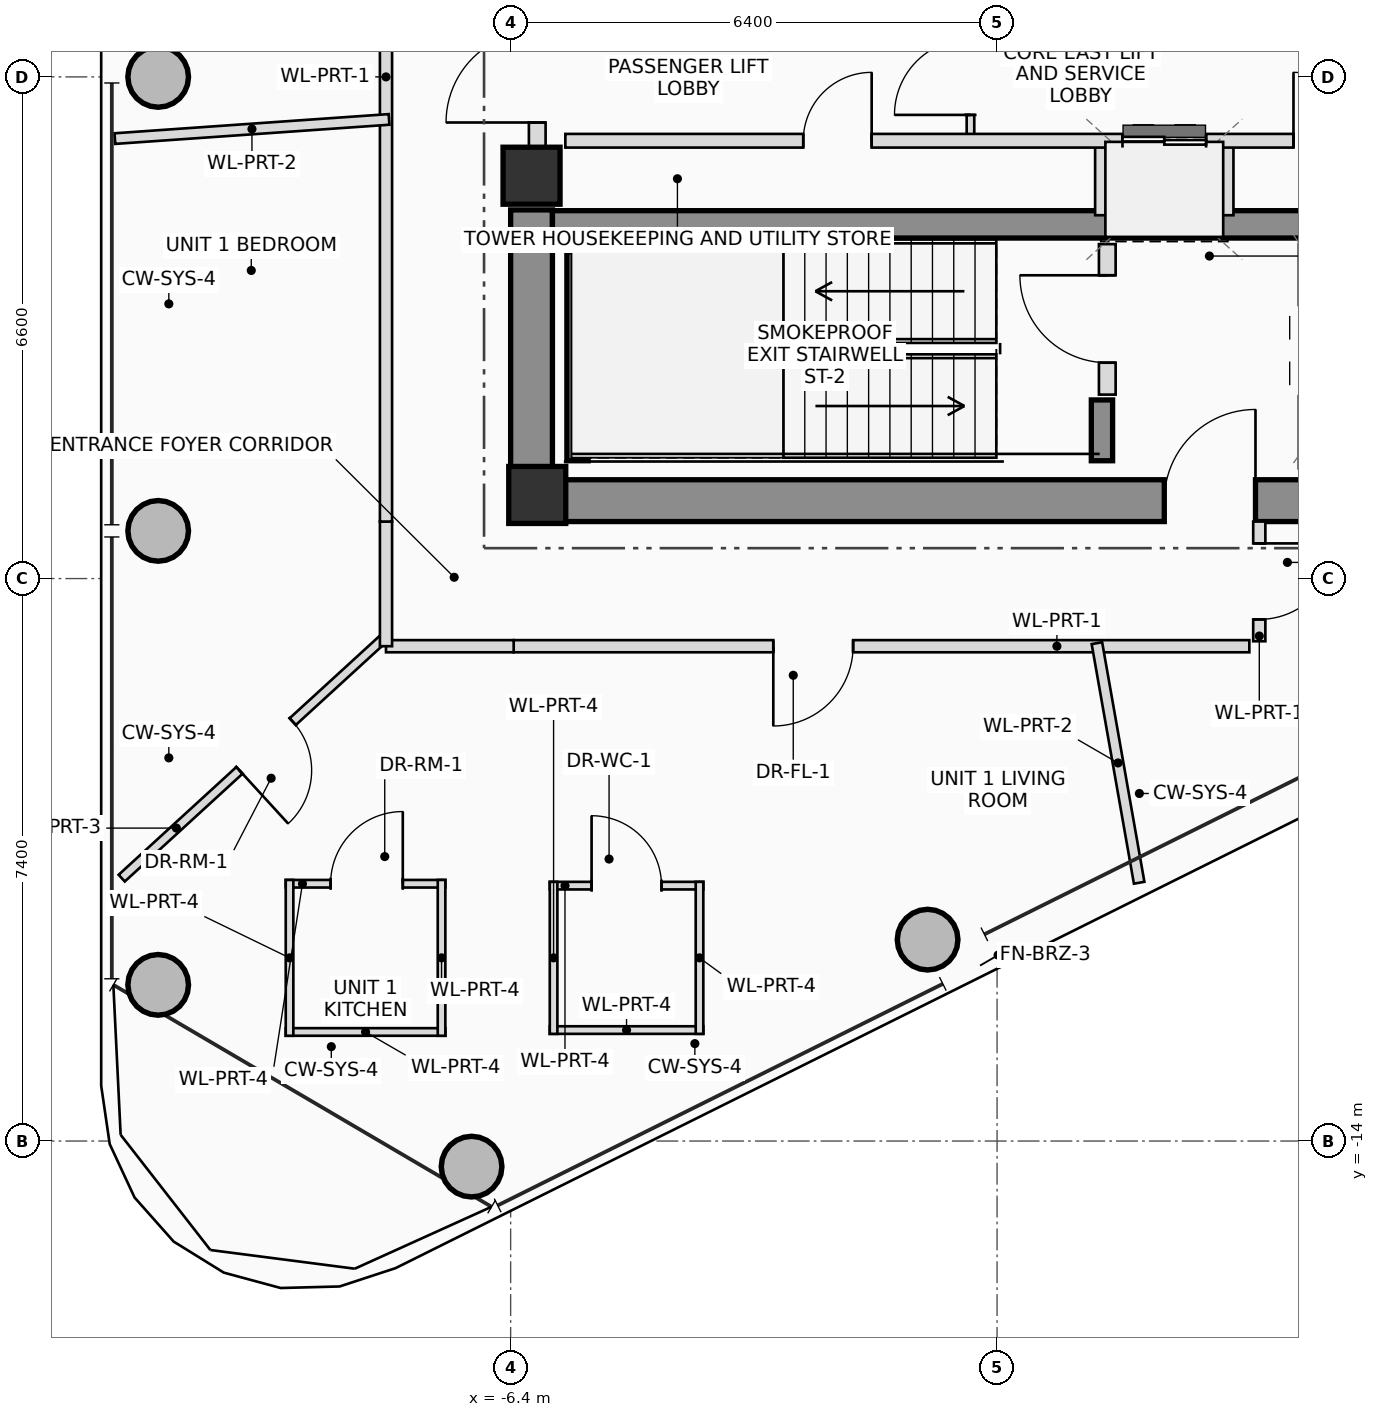
"""IFC4 building model, lengths in metres.
Left out: names, types, materials, properties, quantities, classifications, styles, units other than length and angle.
Written with IfcOpenShell. Run it as: python <this file> out.ifc"""

import sys

from ifc_helpers import new_model, si_unit, direction, frame, frame_2d, origin, origin_2d, place, context, subcontext, project, spatial, rectangle, hollow_circle, extrude, source, transform, mapped, element, fill, save


model = new_model("IFC4")
c1 = context("Model", 3, precision=1e-05, world=origin(), true_north=direction((0.0, 1.0)))
c2 = subcontext(c1, "Body", "Model", "MODEL_VIEW")
j1 = project(units=[si_unit("LENGTHUNIT", "METRE"), si_unit("PLANEANGLEUNIT", "RADIAN")], contexts=[c1])
p1 = place(None, origin())
s1 = spatial("IfcSite", under=j1, at=p1, CompositionType="ELEMENT")
p2 = place(p1, origin())
s2 = spatial("IfcBuilding", under=s1, at=p2, CompositionType="ELEMENT")
p3 = place(p2, frame((0.0, 0.0, 307.1)))
s3 = spatial("IfcBuildingStorey", under=s2, at=p3, CompositionType="ELEMENT", Elevation=307.1)
m1 = source(origin(), c2, "Body", "SweptSolid", [
    extrude(rectangle(XDim=0.75, YDim=0.75, at=origin_2d()), origin(), (0.0, 0.0, 1.0), 3.45),
])
p4 = place(p3, frame((-6.05, -5.5, 0.0), z_axis=(0.0, 0.0, 1.0), x_axis=(1.0, 0.0, 0.0)))
e1 = element("IfcColumn", 1, at=p4, inside=s3, PredefinedType="COLUMN", context=c2, shape_type="MappedRepresentation", body=[
    mapped(m1, transform((0.0, 0.0, 0.0), scale=1.0)),
])
p5 = place(p3, frame((-6.4, -5.575, 0.0), z_axis=(0.0, 0.0, 1.0), x_axis=(1.0, 0.0, 0.0)))
e2 = element("IfcWall", 2, at=p5, inside=s3, PredefinedType="SHEAR", context=c2, shape_type="SweptSolid", body=[
    extrude(rectangle(XDim=12.8, YDim=0.55, at=frame_2d((6.4, 0.0))), origin(), (0.0, 0.0, 1.0), 3.45),
])
p6 = place(p5, frame((8.6, 0.0, 0.0)))
e3 = element("IfcOpeningElement", 3, at=p6, cuts=e2, PredefinedType="OPENING", context=c2, shape_type="SweptSolid", body=[
    extrude(rectangle(XDim=1.2, YDim=2.2, at=frame_2d((0.6, 1.1))), frame((0.0, 0.285, 0.0), z_axis=(0.0, -1.0, 0.0), x_axis=(1.0, 0.0, 0.0)), (0.0, 0.0, 1.0), 0.57),
])
p7 = place(p3, frame((-6.125, -5.3, 0.0), z_axis=(0.0, 0.0, 1.0), x_axis=(0.0, 1.0, 0.0)))
e4 = element("IfcWall", 4, at=p7, inside=s3, PredefinedType="SHEAR", context=c2, shape_type="SweptSolid", body=[
    extrude(rectangle(XDim=3.55, YDim=0.55, at=frame_2d((1.775, 0.0))), origin(), (0.0, 0.0, 1.0), 3.45),
])
p8 = place(p3, frame((-5.85, -1.94, 0.0), z_axis=(0.0, 0.0, 1.0), x_axis=(1.0, 0.0, 0.0)))
e5 = element("IfcWall", 5, at=p8, inside=s3, PredefinedType="SHEAR", context=c2, shape_type="SweptSolid", body=[
    extrude(rectangle(XDim=11.7, YDim=0.36, at=frame_2d((5.85, 0.0))), origin(), (0.0, 0.0, 1.0), 3.45),
])
p9 = place(p3, frame((-5.52, -5.05, 0.0), z_axis=(0.0, 0.0, 1.0), x_axis=(0.0, 1.0, 0.0)))
e6 = element("IfcWall", 6, at=p9, inside=s3, PredefinedType="SHEAR", context=c2, shape_type="SweptSolid", body=[
    extrude(rectangle(XDim=2.75, YDim=0.28, at=frame_2d((1.375, 0.0))), origin(), (0.0, 0.0, 1.0), 3.45),
])
p10 = place(p3, frame((1.38, -5.05, 0.0), z_axis=(0.0, 0.0, 1.0), x_axis=(0.0, 1.0, 0.0)))
e7 = element("IfcWall", 7, at=p10, inside=s3, PredefinedType="SHEAR", context=c2, shape_type="SweptSolid", body=[
    extrude(rectangle(XDim=0.8, YDim=0.28, at=frame_2d((0.4, 0.0))), origin(), (0.0, 0.0, 1.0), 3.45),
])
p11 = place(p3, frame((-6.125, -1.3, 0.0), z_axis=(0.0, 0.0, 1.0), x_axis=(1.0, 0.0, 0.0)))
e8 = element("IfcColumn", 8, at=p11, inside=s3, PredefinedType="COLUMN", context=c2, shape_type="MappedRepresentation", body=[
    mapped(m1, transform((0.0, 0.0, 0.0), scale=1.0)),
])
m2 = source(origin(), c2, "Body", "SweptSolid", [
    extrude(hollow_circle(Radius=0.4, WallThickness=0.028, at=origin_2d()), origin(), (0.0, 0.0, 1.0), 3.45),
])
for number, where, z_axis, x_axis in (
    (9, (-6.914, -14.337, 0.0), (0.0, 0.0, 1.0), (1.0, 0.0, 0.0)),
    (10, (-0.914, -11.35, 0.0), (0.0, 0.0, 1.0), (1.0, 0.0, 0.0)),
    (11, (-11.037, 0.0, 0.0), (0.0, 0.0, 1.0), (1.0, 0.0, 0.0)),
    (12, (-11.037, -5.973, 0.0), (0.0, 0.0, 1.0), (1.0, 0.0, 0.0)),
    (13, (-11.037, -11.945, 0.0), (0.0, 0.0, 1.0), (1.0, 0.0, 0.0)),
):
    element("IfcColumn", number, at=place(p3, frame(where, z_axis=z_axis, x_axis=x_axis)), inside=s3, PredefinedType="COLUMN", context=c2, shape_type="MappedRepresentation", body=[
        mapped(m2, transform((0.0, 0.0, 0.0), scale=1.0)),
    ])
p12 = place(p3, frame((-6.05, -0.95, 0.0), z_axis=(0.0, 0.0, 1.0), x_axis=(0.0, 1.0, 0.0)))
e14 = element("IfcWall", 14, at=p12, inside=s3, PredefinedType="PLUMBINGWALL", context=c2, shape_type="SweptSolid", body=[
    extrude(rectangle(XDim=1.9, YDim=0.22, at=frame_2d((0.95, 0.0))), origin(), (0.0, 0.0, 1.0), 2.23),
])
p13 = place(p12, frame((0.35, 0.0, 0.0)))
e15 = element("IfcOpeningElement", 15, at=p13, cuts=e14, PredefinedType="OPENING", context=c2, shape_type="SweptSolid", body=[
    extrude(rectangle(XDim=1.2, YDim=2.2, at=frame_2d((0.6, 1.1))), frame((0.0, 0.12, 0.0), z_axis=(0.0, -1.0, 0.0), x_axis=(1.0, 0.0, 0.0)), (0.0, 0.0, 1.0), 0.24),
])
p14 = place(p3, frame((1.45, -4.18, 0.0), z_axis=(0.0, 0.0, 1.0), x_axis=(0.0, 1.0, 0.0)))
e16 = element("IfcWall", 16, at=p14, inside=s3, PredefinedType="PLUMBINGWALL", context=c2, shape_type="SweptSolid", body=[
    extrude(rectangle(XDim=1.98, YDim=0.22, at=frame_2d((0.99, 0.0))), origin(), (0.0, 0.0, 1.0), 3.25),
])
p15 = place(p14, frame((0.42, 0.0, 0.0)))
e17 = element("IfcOpeningElement", 17, at=p15, cuts=e16, PredefinedType="OPENING", context=c2, shape_type="SweptSolid", body=[
    extrude(rectangle(XDim=1.15, YDim=2.15, at=frame_2d((0.575, 1.075))), frame((0.0, 0.12, 0.0), z_axis=(0.0, -1.0, 0.0), x_axis=(1.0, 0.0, 0.0)), (0.0, 0.0, 1.0), 0.24),
])
p16 = place(p3, frame((-0.35, -0.84, 0.0), z_axis=(0.0, 0.0, 1.0), x_axis=(0.0, 1.0, 0.0)))
e18 = element("IfcWall", 18, at=p16, inside=s3, PredefinedType="PARTITIONING", context=c2, shape_type="SweptSolid", body=[
    extrude(rectangle(XDim=1.68, YDim=0.1, at=frame_2d((0.84, 0.0))), origin(), (0.0, 0.0, 1.0), 3.25),
])
p17 = place(p16, frame((0.34, 0.0, 0.0)))
e19 = element("IfcOpeningElement", 19, at=p17, cuts=e18, PredefinedType="OPENING", context=c2, shape_type="SweptSolid", body=[
    extrude(rectangle(XDim=1.0, YDim=2.25, at=frame_2d((0.5, 1.125))), frame((0.0, 0.06, 0.0), z_axis=(0.0, -1.0, 0.0), x_axis=(1.0, 0.0, 0.0)), (0.0, 0.0, 1.0), 0.12),
])
for number, where, z_axis, x_axis in (
    (20, (1.38, -1.82, 0.0), (0.0, 0.0, 1.0), (0.0, 1.0, 0.0)),
    (21, (3.02, -1.82, 0.0), (0.0, 0.0, 1.0), (0.0, 1.0, 0.0)),
):
    element("IfcWall", number, at=place(p3, frame(where, z_axis=z_axis, x_axis=x_axis)), inside=s3, PredefinedType="PLUMBINGWALL", context=c2, shape_type="SweptSolid", body=[
        extrude(rectangle(XDim=0.98, YDim=0.18, at=frame_2d((0.49, 0.0))), origin(), (0.0, 0.0, 1.0), 3.25),
    ])
p18 = place(p3, frame((-5.68, -0.84, 0.0), z_axis=(0.0, 0.0, 1.0), x_axis=(1.0, 0.0, 0.0)))
e22 = element("IfcWall", 22, at=p18, inside=s3, PredefinedType="PLUMBINGWALL", context=c2, shape_type="SweptSolid", body=[
    extrude(rectangle(XDim=11.33, YDim=0.18, at=frame_2d((5.665, 0.0))), origin(), (0.0, 0.0, 1.0), 3.25),
])
p19 = place(p18, frame((3.13, 0.0, 0.0)))
e23 = element("IfcOpeningElement", 23, at=p19, cuts=e22, PredefinedType="OPENING", context=c2, shape_type="SweptSolid", body=[
    extrude(rectangle(XDim=0.9, YDim=2.05, at=frame_2d((0.45, 1.025))), frame((0.0, 0.1, 0.0), z_axis=(0.0, -1.0, 0.0), x_axis=(1.0, 0.0, 0.0)), (0.0, 0.0, 1.0), 0.2),
])
p20 = place(p18, frame((7.33, 0.0, 0.0)))
e24 = element("IfcOpeningElement", 24, at=p20, cuts=e22, PredefinedType="OPENING", context=c2, shape_type="SweptSolid", body=[
    extrude(rectangle(XDim=1.1, YDim=2.2, at=frame_2d((0.55, 1.1))), frame((0.0, 0.1, 0.0), z_axis=(0.0, -1.0, 0.0), x_axis=(1.0, 0.0, 0.0)), (0.0, 0.0, 1.0), 0.2),
])
p21 = place(p18, frame((9.58, 0.0, 0.0)))
e25 = element("IfcOpeningElement", 25, at=p21, cuts=e22, PredefinedType="OPENING", context=c2, shape_type="SweptSolid", body=[
    extrude(rectangle(XDim=0.9, YDim=2.05, at=frame_2d((0.45, 1.025))), frame((0.0, 0.1, 0.0), z_axis=(0.0, -1.0, 0.0), x_axis=(1.0, 0.0, 0.0)), (0.0, 0.0, 1.0), 0.2),
])
p22 = place(p3, frame((-8.07, -7.386, 0.0), z_axis=(0.0, 0.0, 1.0), x_axis=(-0.737657036201, -0.675175604523, 0.0)))
e26 = element("IfcWall", 26, at=p22, inside=s3, PredefinedType="PARTITIONING", context=c2, shape_type="SweptSolid", body=[
    extrude(rectangle(XDim=4.673, YDim=0.12, at=frame_2d((2.337, 0.0))), origin(), (0.0, 0.0, 1.0), 2.815),
])
p23 = place(p22, frame((1.623, 0.0, 0.0)))
e27 = element("IfcOpeningElement", 27, at=p23, cuts=e26, PredefinedType="OPENING", context=c2, shape_type="SweptSolid", body=[
    extrude(rectangle(XDim=0.95, YDim=2.1, at=frame_2d((0.475, 1.05))), frame((0.0, 0.07, 0.0), z_axis=(0.0, -1.0, 0.0), x_axis=(1.0, 0.0, 0.0)), (0.0, 0.0, 1.0), 0.14),
])
p24 = place(p3, frame((-5.885, -10.64, 0.0), z_axis=(0.0, 0.0, 1.0), x_axis=(1.0, 0.0, 0.0)))
e28 = element("IfcWall", 28, at=p24, inside=s3, PredefinedType="PARTITIONING", context=c2, shape_type="SweptSolid", body=[
    extrude(rectangle(XDim=2.02, YDim=0.1, at=frame_2d((1.01, 0.0))), origin(), (0.0, 0.0, 1.0), 2.905),
])
p25 = place(p24, frame((0.55, 0.0, 0.0)))
e29 = element("IfcOpeningElement", 29, at=p25, cuts=e28, PredefinedType="OPENING", context=c2, shape_type="SweptSolid", body=[
    extrude(rectangle(XDim=0.92, YDim=2.1, at=frame_2d((0.46, 1.05))), frame((0.0, 0.06, 0.0), z_axis=(0.0, -1.0, 0.0), x_axis=(1.0, 0.0, 0.0)), (0.0, 0.0, 1.0), 0.12),
])
p26 = place(p3, frame((-3.865, -12.54, 0.0), z_axis=(0.0, 0.0, 1.0), x_axis=(-1.0, 0.0, 0.0)))
e30 = element("IfcWall", 30, at=p26, inside=s3, PredefinedType="PARTITIONING", context=c2, shape_type="SweptSolid", body=[
    extrude(rectangle(XDim=2.02, YDim=0.1, at=frame_2d((1.01, 0.0))), origin(), (0.0, 0.0, 1.0), 3.25),
])
for number, where, z_axis, x_axis in (
    (31, (-3.915, -10.59, 0.0), (0.0, 0.0, 1.0), (0.0, -1.0, 0.0)),
    (32, (-5.835, -12.59, 0.0), (0.0, 0.0, 1.0), (0.0, 1.0, 0.0)),
):
    element("IfcWall", number, at=place(p3, frame(where, z_axis=z_axis, x_axis=x_axis)), inside=s3, PredefinedType="PARTITIONING", context=c2, shape_type="SweptSolid", body=[
        extrude(rectangle(XDim=2.0, YDim=0.1, at=frame_2d((1.0, 0.0))), origin(), (0.0, 0.0, 1.0), 2.905),
    ])
p27 = place(p3, frame((-9.359, -10.615, 0.0), z_axis=(0.0, 0.0, 1.0), x_axis=(1.0, 0.0, 0.0)))
e33 = element("IfcWall", 33, at=p27, inside=s3, PredefinedType="PARTITIONING", context=c2, shape_type="SweptSolid", body=[
    extrude(rectangle(XDim=2.1, YDim=0.1, at=frame_2d((1.05, 0.0))), origin(), (0.0, 0.0, 1.0), 2.905),
])
p28 = place(p27, frame((0.59, 0.0, 0.0)))
e34 = element("IfcOpeningElement", 34, at=p28, cuts=e33, PredefinedType="OPENING", context=c2, shape_type="SweptSolid", body=[
    extrude(rectangle(XDim=0.95, YDim=2.1, at=frame_2d((0.475, 1.05))), frame((0.0, 0.06, 0.0), z_axis=(0.0, -1.0, 0.0), x_axis=(1.0, 0.0, 0.0)), (0.0, 0.0, 1.0), 0.12),
])
p29 = place(p3, frame((-7.259, -12.565, 0.0), z_axis=(0.0, 0.0, 1.0), x_axis=(-1.0, 0.0, 0.0)))
e35 = element("IfcWall", 35, at=p29, inside=s3, PredefinedType="PARTITIONING", context=c2, shape_type="SweptSolid", body=[
    extrude(rectangle(XDim=2.1, YDim=0.1, at=frame_2d((1.05, 0.0))), origin(), (0.0, 0.0, 1.0), 3.25),
])
for number, where, z_axis, x_axis in (
    (36, (-7.309, -10.565, 0.0), (0.0, 0.0, 1.0), (0.0, -1.0, 0.0)),
    (37, (-9.309, -12.615, 0.0), (0.0, 0.0, 1.0), (0.0, 1.0, 0.0)),
):
    element("IfcWall", number, at=place(p3, frame(where, z_axis=z_axis, x_axis=x_axis)), inside=s3, PredefinedType="PARTITIONING", context=c2, shape_type="SweptSolid", body=[
        extrude(rectangle(XDim=2.05, YDim=0.1, at=frame_2d((1.025, 0.0))), origin(), (0.0, 0.0, 1.0), 2.905),
    ])
p30 = place(p3, frame((3.45, -5.85, 0.0), z_axis=(0.0, 0.0, 1.0), x_axis=(0.0, -1.0, 0.0)))
e38 = element("IfcWall", 38, at=p30, inside=s3, PredefinedType="PARTITIONING", context=c2, shape_type="SweptSolid", body=[
    extrude(rectangle(XDim=1.575, YDim=0.16, at=frame_2d((0.787, 0.0))), origin(), (0.0, 0.0, 1.0), 2.855),
])
p31 = place(p30, frame((0.287, 0.0, 0.0)))
e39 = element("IfcOpeningElement", 39, at=p31, cuts=e38, PredefinedType="OPENING", context=c2, shape_type="SweptSolid", body=[
    extrude(rectangle(XDim=1.0, YDim=2.25, at=frame_2d((0.5, 1.125))), frame((0.0, 0.09, 0.0), z_axis=(0.0, -1.0, 0.0), x_axis=(1.0, 0.0, 0.0)), (0.0, 0.0, 1.0), 0.18),
])
p32 = place(p3, frame((3.319, -7.49, 0.0), z_axis=(0.0, 0.0, 1.0), x_axis=(-1.0, 0.0, 0.0)))
e40 = element("IfcWall", 40, at=p32, inside=s3, PredefinedType="PARTITIONING", context=c2, shape_type="SweptSolid", body=[
    extrude(rectangle(XDim=9.679, YDim=0.16, at=frame_2d((4.84, 0.0))), origin(), (0.0, 0.0, 1.0), 2.655),
])
p33 = place(p32, frame((5.213, 0.0, 0.0)))
e41 = element("IfcOpeningElement", 41, at=p33, cuts=e40, PredefinedType="OPENING", context=c2, shape_type="SweptSolid", body=[
    extrude(rectangle(XDim=1.05, YDim=2.2, at=frame_2d((0.525, 1.1))), frame((0.0, 0.09, 0.0), z_axis=(0.0, -1.0, 0.0), x_axis=(1.0, 0.0, 0.0)), (0.0, 0.0, 1.0), 0.18),
])
p34 = place(p3, frame((-6.36, -7.49, 0.0), z_axis=(0.0, 0.0, 1.0), x_axis=(-1.0, 0.0, 0.0)))
e42 = element("IfcWall", 42, at=p34, inside=s3, PredefinedType="PARTITIONING", context=c2, shape_type="SweptSolid", body=[
    extrude(rectangle(XDim=1.68, YDim=0.16, at=frame_2d((0.84, 0.0))), origin(), (0.0, 0.0, 1.0), 2.655),
])
p35 = place(p3, frame((-8.04, -7.49, 0.0), z_axis=(0.0, 0.0, 1.0), x_axis=(0.0, 1.0, 0.0)))
e43 = element("IfcWall", 43, at=p35, inside=s3, PredefinedType="PARTITIONING", context=c2, shape_type="SweptSolid", body=[
    extrude(rectangle(XDim=1.64, YDim=0.16, at=frame_2d((0.82, 0.0))), origin(), (0.0, 0.0, 1.0), 3.25),
])
p36 = place(p3, frame((-8.04, -5.85, 0.0), z_axis=(0.0, 0.0, 1.0), x_axis=(0.0, 1.0, 0.0)))
e44 = element("IfcWall", 44, at=p36, inside=s3, PredefinedType="PARTITIONING", context=c2, shape_type="SweptSolid", body=[
    extrude(rectangle(XDim=11.7, YDim=0.16, at=frame_2d((5.85, 0.0))), origin(), (0.0, 0.0, 1.0), 2.655),
])
p37 = place(p3, frame((-8.0, -0.559, 0.0), z_axis=(0.0, 0.0, 1.0), x_axis=(-0.99756047181, -0.069807629118, 0.0)))
e45 = element("IfcWall", 45, at=p37, inside=s3, PredefinedType="PARTITIONING", context=c2, shape_type="SweptSolid", body=[
    extrude(rectangle(XDim=3.616, YDim=0.14, at=frame_2d((1.808, 0.0))), origin(), (0.0, 0.0, 1.0), 2.655),
])
p38 = place(p3, frame((1.314, -7.45, 0.0), z_axis=(0.0, 0.0, 1.0), x_axis=(0.173619966433, -0.984812726997, 0.0)))
e46 = element("IfcWall", 46, at=p38, inside=s3, PredefinedType="PARTITIONING", context=c2, shape_type="SweptSolid", body=[
    extrude(rectangle(XDim=3.2, YDim=0.14, at=frame_2d((1.6, 0.0))), origin(), (0.0, 0.0, 1.0), 2.815),
])
p39 = place(p6, origin())
e47 = element("IfcDoor", 47, at=p39, inside=s3, OperationType="SINGLE_SWING_RIGHT", PredefinedType="DOOR", context=c2, shape_type="SweptSolid", body=[
    extrude(rectangle(XDim=1.2, YDim=2.2, at=frame_2d((0.6, 1.1))), frame((0.0, 0.025, 0.0), z_axis=(0.0, -1.0, 0.0), x_axis=(1.0, 0.0, 0.0)), (0.0, 0.0, 1.0), 0.05),
])
fill(e3, e47)
p40 = place(p13, origin())
e48 = element("IfcDoor", 48, at=p40, inside=s3, OperationType="SINGLE_SWING_LEFT", PredefinedType="DOOR", context=c2, shape_type="SweptSolid", body=[
    extrude(rectangle(XDim=1.2, YDim=2.2, at=frame_2d((0.6, 1.1))), frame((0.0, 0.025, 0.0), z_axis=(0.0, -1.0, 0.0), x_axis=(1.0, 0.0, 0.0)), (0.0, 0.0, 1.0), 0.05),
])
fill(e15, e48)
p41 = place(p15, origin())
e49 = element("IfcDoor", 49, at=p41, inside=s3, OperationType="SINGLE_SWING_RIGHT", PredefinedType="DOOR", context=c2, shape_type="SweptSolid", body=[
    extrude(rectangle(XDim=1.15, YDim=2.15, at=frame_2d((0.575, 1.075))), frame((0.0, 0.025, 0.0), z_axis=(0.0, -1.0, 0.0), x_axis=(1.0, 0.0, 0.0)), (0.0, 0.0, 1.0), 0.05),
])
fill(e17, e49)
p42 = place(p17, origin())
e50 = element("IfcDoor", 50, at=p42, inside=s3, OperationType="SINGLE_SWING_LEFT", PredefinedType="DOOR", context=c2, shape_type="SweptSolid", body=[
    extrude(rectangle(XDim=1.0, YDim=2.25, at=frame_2d((0.5, 1.125))), frame((0.0, 0.025, 0.0), z_axis=(0.0, -1.0, 0.0), x_axis=(1.0, 0.0, 0.0)), (0.0, 0.0, 1.0), 0.05),
])
fill(e19, e50)
p43 = place(p19, origin())
e51 = element("IfcDoor", 51, at=p43, inside=s3, OperationType="SINGLE_SWING_RIGHT", PredefinedType="DOOR", context=c2, shape_type="SweptSolid", body=[
    extrude(rectangle(XDim=0.9, YDim=2.05, at=frame_2d((0.45, 1.025))), frame((0.0, 0.025, 0.0), z_axis=(0.0, -1.0, 0.0), x_axis=(1.0, 0.0, 0.0)), (0.0, 0.0, 1.0), 0.05),
])
fill(e23, e51)
p44 = place(p20, origin())
e52 = element("IfcDoor", 52, at=p44, inside=s3, OperationType="DOUBLE_DOOR_SLIDING", PredefinedType="DOOR", context=c2, shape_type="SweptSolid", body=[
    extrude(rectangle(XDim=1.1, YDim=2.2, at=frame_2d((0.55, 1.1))), frame((0.0, 0.025, 0.0), z_axis=(0.0, -1.0, 0.0), x_axis=(1.0, 0.0, 0.0)), (0.0, 0.0, 1.0), 0.05),
])
fill(e24, e52)
p45 = place(p21, origin())
e53 = element("IfcDoor", 53, at=p45, inside=s3, OperationType="SINGLE_SWING_LEFT", PredefinedType="DOOR", context=c2, shape_type="SweptSolid", body=[
    extrude(rectangle(XDim=0.9, YDim=2.05, at=frame_2d((0.45, 1.025))), frame((0.0, 0.025, 0.0), z_axis=(0.0, -1.0, 0.0), x_axis=(1.0, 0.0, 0.0)), (0.0, 0.0, 1.0), 0.05),
])
fill(e25, e53)
p46 = place(p23, origin())
e54 = element("IfcDoor", 54, at=p46, inside=s3, OperationType="SINGLE_SWING_RIGHT", PredefinedType="DOOR", context=c2, shape_type="SweptSolid", body=[
    extrude(rectangle(XDim=0.95, YDim=2.1, at=frame_2d((0.475, 1.05))), frame((0.0, 0.025, 0.0), z_axis=(0.0, -1.0, 0.0), x_axis=(1.0, 0.0, 0.0)), (0.0, 0.0, 1.0), 0.05),
])
fill(e27, e54)
p47 = place(p25, origin())
e55 = element("IfcDoor", 55, at=p47, inside=s3, OperationType="SINGLE_SWING_LEFT", PredefinedType="DOOR", context=c2, shape_type="SweptSolid", body=[
    extrude(rectangle(XDim=0.92, YDim=2.1, at=frame_2d((0.46, 1.05))), frame((0.0, 0.025, 0.0), z_axis=(0.0, -1.0, 0.0), x_axis=(1.0, 0.0, 0.0)), (0.0, 0.0, 1.0), 0.05),
])
fill(e29, e55)
p48 = place(p28, origin())
e56 = element("IfcDoor", 56, at=p48, inside=s3, OperationType="SINGLE_SWING_RIGHT", PredefinedType="DOOR", context=c2, shape_type="SweptSolid", body=[
    extrude(rectangle(XDim=0.95, YDim=2.1, at=frame_2d((0.475, 1.05))), frame((0.0, 0.025, 0.0), z_axis=(0.0, -1.0, 0.0), x_axis=(1.0, 0.0, 0.0)), (0.0, 0.0, 1.0), 0.05),
])
fill(e34, e56)
p49 = place(p31, origin())
e57 = element("IfcDoor", 57, at=p49, inside=s3, OperationType="SINGLE_SWING_LEFT", PredefinedType="DOOR", context=c2, shape_type="SweptSolid", body=[
    extrude(rectangle(XDim=1.0, YDim=2.25, at=frame_2d((0.5, 1.125))), frame((0.0, 0.025, 0.0), z_axis=(0.0, -1.0, 0.0), x_axis=(1.0, 0.0, 0.0)), (0.0, 0.0, 1.0), 0.05),
])
fill(e39, e57)
p50 = place(p33, origin())
e58 = element("IfcDoor", 58, at=p50, inside=s3, OperationType="SINGLE_SWING_RIGHT", PredefinedType="DOOR", context=c2, shape_type="SweptSolid", body=[
    extrude(rectangle(XDim=1.05, YDim=2.2, at=frame_2d((0.525, 1.1))), frame((0.0, 0.025, 0.0), z_axis=(0.0, -1.0, 0.0), x_axis=(1.0, 0.0, 0.0)), (0.0, 0.0, 1.0), 0.05),
])
fill(e41, e58)
save(model, sys.argv[1])
